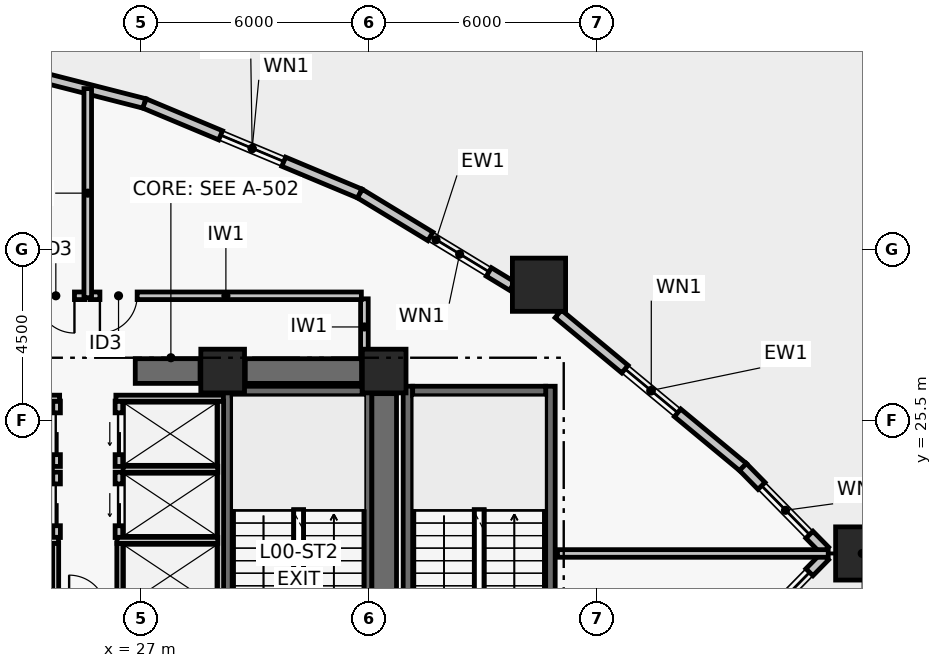
"""IFC4 building model, lengths in metres.
Left out: names, types, materials, properties, quantities, classifications, styles, units other than length and angle.
Written with IfcOpenShell. Run it as: python <this file> out.ifc"""

import sys

from ifc_helpers import new_model, si_unit, direction, frame, frame_2d, origin, origin_2d, place, context, subcontext, project, spatial, rectangle, hollow_rectangle, extrude, element, fill, save


model = new_model("IFC4")
c1 = context("Model", 3, precision=1e-05, world=origin(), true_north=direction((0.0, 1.0)))
c2 = subcontext(c1, "Body", "Model", "MODEL_VIEW")
j1 = project(units=[si_unit("LENGTHUNIT", "METRE"), si_unit("PLANEANGLEUNIT", "RADIAN")], contexts=[c1])
p1 = place(None, origin())
s1 = spatial("IfcSite", under=j1, at=p1, CompositionType="ELEMENT")
p2 = place(p1, origin())
s2 = spatial("IfcBuilding", under=s1, at=p2, CompositionType="ELEMENT")
p3 = place(p2, origin())
s3 = spatial("IfcBuildingStorey", under=s2, at=p3, CompositionType="ELEMENT", Elevation=0.0)
for number, where, z_axis, x_axis in (
    (1, (29.15, 26.8, 0.0), (0.0, 0.0, 1.0), (1.0, 0.0, 0.0)),
    (2, (33.4, 26.8, 0.0), (0.0, 0.0, 1.0), (1.0, 0.0, 0.0)),
):
    element("IfcColumn", number, at=place(p3, frame(where, z_axis=z_axis, x_axis=x_axis)), inside=s3, PredefinedType="COLUMN", context=c2, shape_type="SweptSolid", body=[
        extrude(rectangle(XDim=1.15, YDim=1.15, at=origin_2d()), origin(), (0.0, 0.0, 1.0), 7.2),
    ])
p4 = place(p3, frame((26.85, 26.8, 0.0), z_axis=(0.0, 0.0, 1.0), x_axis=(1.0, 0.0, 0.0)))
e3 = element("IfcWall", 3, at=p4, inside=s3, PredefinedType="SHEAR", context=c2, shape_type="SweptSolid", body=[
    extrude(rectangle(XDim=1.705, YDim=0.65, at=frame_2d((0.853, 0.0))), origin(), (0.0, 0.0, 1.0), 6.88),
])
p5 = place(p3, frame((29.745, 26.8, 0.0), z_axis=(0.0, 0.0, 1.0), x_axis=(1.0, 0.0, 0.0)))
e4 = element("IfcWall", 4, at=p5, inside=s3, PredefinedType="SHEAR", context=c2, shape_type="SweptSolid", body=[
    extrude(rectangle(XDim=3.06, YDim=0.65, at=frame_2d((1.53, 0.0))), origin(), (0.0, 0.0, 1.0), 6.88),
])
p6 = place(p3, frame((33.4, 17.795, 0.0), z_axis=(0.0, 0.0, 1.0), x_axis=(0.0, 1.0, 0.0)))
e5 = element("IfcWall", 5, at=p6, inside=s3, PredefinedType="SHEAR", context=c2, shape_type="SweptSolid", body=[
    extrude(rectangle(XDim=8.41, YDim=0.65, at=frame_2d((4.205, 0.0))), origin(), (0.0, 0.0, 1.0), 6.88),
])
p7 = place(p3, frame((29.275, 17.6, 0.0), z_axis=(0.0, 0.0, 1.0), x_axis=(0.0, 1.0, 0.0)))
e6 = element("IfcWall", 6, at=p7, inside=s3, PredefinedType="SHEAR", context=c2, shape_type="SweptSolid", body=[
    extrude(rectangle(XDim=8.8, YDim=0.25, at=frame_2d((4.4, 0.0))), origin(), (0.0, 0.0, 1.0), 6.88),
])
p8 = place(p7, frame((0.35, 0.0, 0.0)))
e7 = element("IfcOpeningElement", 7, at=p8, cuts=e6, PredefinedType="OPENING", context=c2, shape_type="SweptSolid", body=[
    extrude(rectangle(XDim=1.05, YDim=2.08, at=frame_2d((0.525, 1.04))), frame((0.0, 0.135, 0.0), z_axis=(0.0, -1.0, 0.0), x_axis=(1.0, 0.0, 0.0)), (0.0, 0.0, 1.0), 0.27),
])
p9 = place(p3, frame((32.946, 17.6, 0.0), z_axis=(0.0, 0.0, 1.0), x_axis=(0.0, 1.0, 0.0)))
e8 = element("IfcWall", 8, at=p9, inside=s3, PredefinedType="SHEAR", context=c2, shape_type="SweptSolid", body=[
    extrude(rectangle(XDim=8.8, YDim=0.25, at=frame_2d((4.4, 0.0))), origin(), (0.0, 0.0, 1.0), 6.88),
])
p10 = place(p3, frame((29.4, 26.275, 0.0), z_axis=(0.0, 0.0, 1.0), x_axis=(1.0, 0.0, 0.0)))
e9 = element("IfcWall", 9, at=p10, inside=s3, PredefinedType="SHEAR", context=c2, shape_type="SweptSolid", body=[
    extrude(rectangle(XDim=3.421, YDim=0.25, at=frame_2d((1.71, 0.0))), origin(), (0.0, 0.0, 1.0), 6.88),
])
for number, where, z_axis, x_axis in (
    (10, (34.025, 17.6, 0.0), (0.0, 0.0, 1.0), (0.0, 1.0, 0.0)),
    (11, (37.775, 17.6, 0.0), (0.0, 0.0, 1.0), (0.0, 1.0, 0.0)),
):
    element("IfcWall", number, at=place(p3, frame(where, z_axis=z_axis, x_axis=x_axis)), inside=s3, PredefinedType="SHEAR", context=c2, shape_type="SweptSolid", body=[
        extrude(rectangle(XDim=8.8, YDim=0.25, at=frame_2d((4.4, 0.0))), origin(), (0.0, 0.0, 1.0), 6.88),
    ])
p11 = place(p3, frame((34.15, 26.275, 0.0), z_axis=(0.0, 0.0, 1.0), x_axis=(1.0, 0.0, 0.0)))
e12 = element("IfcWall", 12, at=p11, inside=s3, PredefinedType="SHEAR", context=c2, shape_type="SweptSolid", body=[
    extrude(rectangle(XDim=3.5, YDim=0.25, at=frame_2d((1.75, 0.0))), origin(), (0.0, 0.0, 1.0), 6.88),
])
for number, where, z_axis, x_axis in (
    (13, (45.979, 22.0, 0.0), (0.0, 0.0, 1.0), (1.0, 0.0, 0.0)),
    (14, (37.474, 29.071, 0.0), (0.0, 0.0, 1.0), (1.0, 0.0, 0.0)),
):
    element("IfcColumn", number, at=place(p3, frame(where, z_axis=z_axis, x_axis=x_axis)), inside=s3, PredefinedType="USERDEFINED", context=c2, shape_type="SweptSolid", body=[
        extrude(hollow_rectangle(XDim=1.4, YDim=1.4, WallThickness=0.055, at=origin_2d()), origin(), (0.0, 0.0, 1.0), 7.2),
    ])
p12 = place(p3, frame((21.002, 35.394, 0.0), z_axis=(0.0, 0.0, 1.0), x_axis=(0.968977702302, -0.247148158887, 0.0)))
e15 = element("IfcWall", 15, at=p12, inside=s3, PredefinedType="PARTITIONING", context=c2, shape_type="SweptSolid", body=[
    extrude(rectangle(XDim=6.286, YDim=0.26, at=frame_2d((3.143, 0.0))), origin(), (0.0, 0.0, 1.0), 5.43),
])
p13 = place(p3, frame((27.092, 33.84, 0.0), z_axis=(0.0, 0.0, 1.0), x_axis=(0.922544641811, -0.385890378042, 0.0)))
e16 = element("IfcWall", 16, at=p13, inside=s3, PredefinedType="PARTITIONING", context=c2, shape_type="SweptSolid", body=[
    extrude(rectangle(XDim=6.144, YDim=0.26, at=frame_2d((3.072, 0.0))), origin(), (0.0, 0.0, 1.0), 5.43),
])
p14 = place(p13, frame((2.172, 0.0, 0.9)))
e17 = element("IfcOpeningElement", 17, at=p14, cuts=e16, PredefinedType="OPENING", context=c2, shape_type="SweptSolid", body=[
    extrude(rectangle(XDim=1.8, YDim=1.5, at=frame_2d((0.9, 0.75))), frame((0.0, 0.14, 0.0), z_axis=(0.0, -1.0, 0.0), x_axis=(1.0, 0.0, 0.0)), (0.0, 0.0, 1.0), 0.28),
])
p15 = place(p3, frame((32.76, 31.469, 0.0), z_axis=(0.0, 0.0, 1.0), x_axis=(0.854658781081, -0.519190107688, 0.0)))
e18 = element("IfcWall", 18, at=p15, inside=s3, PredefinedType="PARTITIONING", context=c2, shape_type="SweptSolid", body=[
    extrude(rectangle(XDim=4.688, YDim=0.26, at=frame_2d((2.344, 0.0))), origin(), (0.0, 0.0, 1.0), 5.43),
])
p16 = place(p15, frame((2.172, 0.0, 0.9)))
e19 = element("IfcOpeningElement", 19, at=p16, cuts=e18, PredefinedType="OPENING", context=c2, shape_type="SweptSolid", body=[
    extrude(rectangle(XDim=1.8, YDim=1.5, at=frame_2d((0.9, 0.75))), frame((0.0, 0.14, 0.0), z_axis=(0.0, -1.0, 0.0), x_axis=(1.0, 0.0, 0.0)), (0.0, 0.0, 1.0), 0.28),
])
p17 = place(p3, frame((37.982, 28.304, 0.0), z_axis=(0.0, 0.0, 1.0), x_axis=(0.769753796379, -0.638340890873, 0.0)))
e20 = element("IfcWall", 20, at=p17, inside=s3, PredefinedType="PARTITIONING", context=c2, shape_type="SweptSolid", body=[
    extrude(rectangle(XDim=6.324, YDim=0.26, at=frame_2d((3.162, 0.0))), origin(), (0.0, 0.0, 1.0), 5.43),
])
p18 = place(p17, frame((2.278, 0.0, 0.9)))
e21 = element("IfcOpeningElement", 21, at=p18, cuts=e20, PredefinedType="OPENING", context=c2, shape_type="SweptSolid", body=[
    extrude(rectangle(XDim=1.8, YDim=1.5, at=frame_2d((0.9, 0.75))), frame((0.0, 0.14, 0.0), z_axis=(0.0, -1.0, 0.0), x_axis=(1.0, 0.0, 0.0)), (0.0, 0.0, 1.0), 0.28),
])
p19 = place(p3, frame((42.841, 24.275, 0.0), z_axis=(0.0, 0.0, 1.0), x_axis=(0.700581279712, -0.713572610543, 0.0)))
e22 = element("IfcWall", 22, at=p19, inside=s3, PredefinedType="PARTITIONING", context=c2, shape_type="SweptSolid", body=[
    extrude(rectangle(XDim=3.082, YDim=0.26, at=frame_2d((1.541, 0.0))), origin(), (0.0, 0.0, 1.0), 5.43),
])
p20 = place(p19, frame((0.698, 0.0, 0.9)))
e23 = element("IfcOpeningElement", 23, at=p20, cuts=e22, PredefinedType="OPENING", context=c2, shape_type="SweptSolid", body=[
    extrude(rectangle(XDim=1.8, YDim=1.5, at=frame_2d((0.9, 0.75))), frame((0.0, 0.14, 0.0), z_axis=(0.0, -1.0, 0.0), x_axis=(1.0, 0.0, 0.0)), (0.0, 0.0, 1.0), 0.28),
])
p21 = place(p3, frame((45.0, 21.924, 0.0), z_axis=(0.0, 0.0, 1.0), x_axis=(-0.700581279712, -0.713572610543, 0.0)))
e24 = element("IfcWall", 24, at=p21, inside=s3, PredefinedType="PARTITIONING", context=c2, shape_type="SweptSolid", body=[
    extrude(rectangle(XDim=3.082, YDim=0.26, at=frame_2d((1.541, 0.0))), origin(), (0.0, 0.0, 1.0), 5.43),
])
p22 = place(p21, frame((0.585, 0.0, 0.9)))
e25 = element("IfcOpeningElement", 25, at=p22, cuts=e24, PredefinedType="OPENING", context=c2, shape_type="SweptSolid", body=[
    extrude(rectangle(XDim=1.8, YDim=1.5, at=frame_2d((0.9, 0.75))), frame((0.0, 0.14, 0.0), z_axis=(0.0, -1.0, 0.0), x_axis=(1.0, 0.0, 0.0)), (0.0, 0.0, 1.0), 0.28),
])
p23 = place(p3, frame((24.78, 22.42, 0.0), z_axis=(0.0, 0.0, 1.0), x_axis=(0.0, 1.0, 0.0)))
e26 = element("IfcWall", 26, at=p23, inside=s3, PredefinedType="PARTITIONING", context=c2, shape_type="SweptSolid", body=[
    extrude(rectangle(XDim=1.72, YDim=0.2, at=frame_2d((0.86, 0.0))), origin(), (0.0, 0.0, 1.0), 6.88),
])
p24 = place(p23, frame((0.31, 0.0, 0.0)))
e27 = element("IfcOpeningElement", 27, at=p24, cuts=e26, PredefinedType="OPENING", context=c2, shape_type="SweptSolid", body=[
    extrude(rectangle(XDim=1.1, YDim=2.08, at=frame_2d((0.55, 1.04))), frame((0.0, 0.11, 0.0), z_axis=(0.0, -1.0, 0.0), x_axis=(1.0, 0.0, 0.0)), (0.0, 0.0, 1.0), 0.22),
])
p25 = place(p3, frame((24.78, 24.29, 0.0), z_axis=(0.0, 0.0, 1.0), x_axis=(0.0, 1.0, 0.0)))
e28 = element("IfcWall", 28, at=p25, inside=s3, PredefinedType="PARTITIONING", context=c2, shape_type="SweptSolid", body=[
    extrude(rectangle(XDim=1.72, YDim=0.2, at=frame_2d((0.86, 0.0))), origin(), (0.0, 0.0, 1.0), 6.88),
])
p26 = place(p25, frame((0.31, 0.0, 0.0)))
e29 = element("IfcOpeningElement", 29, at=p26, cuts=e28, PredefinedType="OPENING", context=c2, shape_type="SweptSolid", body=[
    extrude(rectangle(XDim=1.1, YDim=2.08, at=frame_2d((0.55, 1.04))), frame((0.0, 0.11, 0.0), z_axis=(0.0, -1.0, 0.0), x_axis=(1.0, 0.0, 0.0)), (0.0, 0.0, 1.0), 0.22),
])
p27 = place(p3, frame((26.42, 22.42, 0.0), z_axis=(0.0, 0.0, 1.0), x_axis=(0.0, 1.0, 0.0)))
e30 = element("IfcWall", 30, at=p27, inside=s3, PredefinedType="PARTITIONING", context=c2, shape_type="SweptSolid", body=[
    extrude(rectangle(XDim=1.72, YDim=0.2, at=frame_2d((0.86, 0.0))), origin(), (0.0, 0.0, 1.0), 6.88),
])
p28 = place(p27, frame((0.31, 0.0, 0.0)))
e31 = element("IfcOpeningElement", 31, at=p28, cuts=e30, PredefinedType="OPENING", context=c2, shape_type="SweptSolid", body=[
    extrude(rectangle(XDim=1.1, YDim=2.08, at=frame_2d((0.55, 1.04))), frame((0.0, 0.11, 0.0), z_axis=(0.0, -1.0, 0.0), x_axis=(1.0, 0.0, 0.0)), (0.0, 0.0, 1.0), 0.22),
])
p29 = place(p3, frame((26.42, 24.29, 0.0), z_axis=(0.0, 0.0, 1.0), x_axis=(0.0, 1.0, 0.0)))
e32 = element("IfcWall", 32, at=p29, inside=s3, PredefinedType="PARTITIONING", context=c2, shape_type="SweptSolid", body=[
    extrude(rectangle(XDim=1.72, YDim=0.2, at=frame_2d((0.86, 0.0))), origin(), (0.0, 0.0, 1.0), 6.88),
])
p30 = place(p29, frame((0.31, 0.0, 0.0)))
e33 = element("IfcOpeningElement", 33, at=p30, cuts=e32, PredefinedType="OPENING", context=c2, shape_type="SweptSolid", body=[
    extrude(rectangle(XDim=1.1, YDim=2.08, at=frame_2d((0.55, 1.04))), frame((0.0, 0.11, 0.0), z_axis=(0.0, -1.0, 0.0), x_axis=(1.0, 0.0, 0.0)), (0.0, 0.0, 1.0), 0.22),
])
p31 = place(p3, frame((24.755, 20.56, 0.0), z_axis=(0.0, 0.0, 1.0), x_axis=(0.0, 1.0, 0.0)))
e34 = element("IfcWall", 34, at=p31, inside=s3, PredefinedType="PARTITIONING", context=c2, shape_type="SweptSolid", body=[
    extrude(rectangle(XDim=1.71, YDim=0.16, at=frame_2d((0.855, 0.0))), origin(), (0.0, 0.0, 1.0), 6.88),
])
p32 = place(p3, frame((22.18, 22.345, 0.0), z_axis=(0.0, 0.0, 1.0), x_axis=(1.0, 0.0, 0.0)))
e35 = element("IfcWall", 35, at=p32, inside=s3, PredefinedType="PARTITIONING", context=c2, shape_type="SweptSolid", body=[
    extrude(rectangle(XDim=2.65, YDim=0.16, at=frame_2d((1.325, 0.0))), origin(), (0.0, 0.0, 1.0), 6.88),
])
p33 = place(p3, frame((22.18, 24.215, 0.0), z_axis=(0.0, 0.0, 1.0), x_axis=(1.0, 0.0, 0.0)))
e36 = element("IfcWall", 36, at=p33, inside=s3, PredefinedType="PARTITIONING", context=c2, shape_type="SweptSolid", body=[
    extrude(rectangle(XDim=2.49, YDim=0.16, at=frame_2d((1.245, 0.0))), origin(), (0.0, 0.0, 1.0), 6.88),
])
p34 = place(p3, frame((22.03, 26.085, 0.0), z_axis=(0.0, 0.0, 1.0), x_axis=(1.0, 0.0, 0.0)))
e37 = element("IfcWall", 37, at=p34, inside=s3, PredefinedType="PARTITIONING", context=c2, shape_type="SweptSolid", body=[
    extrude(rectangle(XDim=2.83, YDim=0.16, at=frame_2d((1.415, 0.0))), origin(), (0.0, 0.0, 1.0), 6.88),
])
p35 = place(p3, frame((29.095, 20.56, 0.0), z_axis=(0.0, 0.0, 1.0), x_axis=(0.0, 1.0, 0.0)))
e38 = element("IfcWall", 38, at=p35, inside=s3, PredefinedType="PARTITIONING", context=c2, shape_type="SweptSolid", body=[
    extrude(rectangle(XDim=5.45, YDim=0.16, at=frame_2d((2.725, 0.0))), origin(), (0.0, 0.0, 1.0), 6.88),
])
p36 = place(p3, frame((26.445, 20.56, 0.0), z_axis=(0.0, 0.0, 1.0), x_axis=(0.0, 1.0, 0.0)))
e39 = element("IfcWall", 39, at=p36, inside=s3, PredefinedType="PARTITIONING", context=c2, shape_type="SweptSolid", body=[
    extrude(rectangle(XDim=1.71, YDim=0.16, at=frame_2d((0.855, 0.0))), origin(), (0.0, 0.0, 1.0), 6.88),
])
p37 = place(p3, frame((26.37, 22.345, 0.0), z_axis=(0.0, 0.0, 1.0), x_axis=(1.0, 0.0, 0.0)))
e40 = element("IfcWall", 40, at=p37, inside=s3, PredefinedType="PARTITIONING", context=c2, shape_type="SweptSolid", body=[
    extrude(rectangle(XDim=2.65, YDim=0.16, at=frame_2d((1.325, 0.0))), origin(), (0.0, 0.0, 1.0), 6.88),
])
p38 = place(p3, frame((26.53, 24.215, 0.0), z_axis=(0.0, 0.0, 1.0), x_axis=(1.0, 0.0, 0.0)))
e41 = element("IfcWall", 41, at=p38, inside=s3, PredefinedType="PARTITIONING", context=c2, shape_type="SweptSolid", body=[
    extrude(rectangle(XDim=2.49, YDim=0.16, at=frame_2d((1.245, 0.0))), origin(), (0.0, 0.0, 1.0), 6.88),
])
p39 = place(p3, frame((26.34, 26.085, 0.0), z_axis=(0.0, 0.0, 1.0), x_axis=(1.0, 0.0, 0.0)))
e42 = element("IfcWall", 42, at=p39, inside=s3, PredefinedType="PARTITIONING", context=c2, shape_type="SweptSolid", body=[
    extrude(rectangle(XDim=2.83, YDim=0.16, at=frame_2d((1.415, 0.0))), origin(), (0.0, 0.0, 1.0), 6.88),
])
p40 = place(p3, frame((33.74, 27.22, 0.0), z_axis=(0.0, 0.0, 1.0), x_axis=(-1.0, 0.0, 0.0)))
e43 = element("IfcWall", 43, at=p40, inside=s3, PredefinedType="PARTITIONING", context=c2, shape_type="SweptSolid", body=[
    extrude(rectangle(XDim=0.86, YDim=0.2, at=frame_2d((0.43, 0.0))), origin(), (0.0, 0.0, 1.0), 5.46),
])
p41 = place(p3, frame((32.88, 27.22, 0.0), z_axis=(0.0, 0.0, 1.0), x_axis=(0.0, 1.0, 0.0)))
e44 = element("IfcWall", 44, at=p41, inside=s3, PredefinedType="PARTITIONING", context=c2, shape_type="SweptSolid", body=[
    extrude(rectangle(XDim=1.48, YDim=0.2, at=frame_2d((0.74, 0.0))), origin(), (0.0, 0.0, 1.0), 6.01),
])
p42 = place(p3, frame((32.8, 28.78, 0.0), z_axis=(0.0, 0.0, 1.0), x_axis=(-1.0, 0.0, 0.0)))
e45 = element("IfcWall", 45, at=p42, inside=s3, PredefinedType="PARTITIONING", context=c2, shape_type="SweptSolid", body=[
    extrude(rectangle(XDim=7.13, YDim=0.2, at=frame_2d((3.565, 0.0))), origin(), (0.0, 0.0, 1.0), 6.88),
])
p43 = place(p42, frame((5.9, 0.0, 0.0)))
e46 = element("IfcOpeningElement", 46, at=p43, cuts=e45, PredefinedType="OPENING", context=c2, shape_type="SweptSolid", body=[
    extrude(rectangle(XDim=0.98, YDim=2.06, at=frame_2d((0.49, 1.03))), frame((0.0, 0.11, 0.0), z_axis=(0.0, -1.0, 0.0), x_axis=(1.0, 0.0, 0.0)), (0.0, 0.0, 1.0), 0.22),
])
p44 = place(p3, frame((25.53, 28.78, 0.0), z_axis=(0.0, 0.0, 1.0), x_axis=(-1.0, 0.0, 0.0)))
e47 = element("IfcWall", 47, at=p44, inside=s3, PredefinedType="PARTITIONING", context=c2, shape_type="SweptSolid", body=[
    extrude(rectangle(XDim=7.978, YDim=0.2, at=frame_2d((3.989, 0.0))), origin(), (0.0, 0.0, 1.0), 5.46),
])
p45 = place(p44, frame((0.28, 0.0, 0.0)))
e48 = element("IfcOpeningElement", 48, at=p45, cuts=e47, PredefinedType="OPENING", context=c2, shape_type="SweptSolid", body=[
    extrude(rectangle(XDim=0.98, YDim=2.06, at=frame_2d((0.49, 1.03))), frame((0.0, 0.11, 0.0), z_axis=(0.0, -1.0, 0.0), x_axis=(1.0, 0.0, 0.0)), (0.0, 0.0, 1.0), 0.22),
])
p46 = place(p3, frame((25.6, 28.73, 0.0), z_axis=(0.0, 0.0, 1.0), x_axis=(0.0, 1.0, 0.0)))
e49 = element("IfcWall", 49, at=p46, inside=s3, PredefinedType="PARTITIONING", context=c2, shape_type="SweptSolid", body=[
    extrude(rectangle(XDim=5.501, YDim=0.2, at=frame_2d((2.75, 0.0))), origin(), (0.0, 0.0, 1.0), 6.88),
])
p47 = place(p3, frame((37.96, 22.0, 0.0), z_axis=(0.0, 0.0, 1.0), x_axis=(1.0, 0.0, 0.0)))
e50 = element("IfcWall", 50, at=p47, inside=s3, PredefinedType="PARTITIONING", context=c2, shape_type="SweptSolid", body=[
    extrude(rectangle(XDim=7.125, YDim=0.2, at=frame_2d((3.562, 0.0))), origin(), (0.0, 0.0, 1.0), 6.88),
])
p48 = place(p14, origin())
e51 = element("IfcWindow", 51, at=p48, inside=s3, PartitioningType="SINGLE_PANEL", PredefinedType="WINDOW", context=c2, shape_type="SweptSolid", body=[
    extrude(rectangle(XDim=1.8, YDim=1.5, at=frame_2d((0.9, 0.75))), frame((0.0, 0.03, 0.0), z_axis=(0.0, -1.0, 0.0), x_axis=(1.0, 0.0, 0.0)), (0.0, 0.0, 1.0), 0.06),
])
fill(e17, e51)
p49 = place(p16, origin())
e52 = element("IfcWindow", 52, at=p49, inside=s3, PartitioningType="SINGLE_PANEL", PredefinedType="WINDOW", context=c2, shape_type="SweptSolid", body=[
    extrude(rectangle(XDim=1.8, YDim=1.5, at=frame_2d((0.9, 0.75))), frame((0.0, 0.03, 0.0), z_axis=(0.0, -1.0, 0.0), x_axis=(1.0, 0.0, 0.0)), (0.0, 0.0, 1.0), 0.06),
])
fill(e19, e52)
p50 = place(p18, origin())
e53 = element("IfcWindow", 53, at=p50, inside=s3, PartitioningType="SINGLE_PANEL", PredefinedType="WINDOW", context=c2, shape_type="SweptSolid", body=[
    extrude(rectangle(XDim=1.8, YDim=1.5, at=frame_2d((0.9, 0.75))), frame((0.0, 0.03, 0.0), z_axis=(0.0, -1.0, 0.0), x_axis=(1.0, 0.0, 0.0)), (0.0, 0.0, 1.0), 0.06),
])
fill(e21, e53)
p51 = place(p20, origin())
e54 = element("IfcWindow", 54, at=p51, inside=s3, PartitioningType="SINGLE_PANEL", PredefinedType="WINDOW", context=c2, shape_type="SweptSolid", body=[
    extrude(rectangle(XDim=1.8, YDim=1.5, at=frame_2d((0.9, 0.75))), frame((0.0, 0.03, 0.0), z_axis=(0.0, -1.0, 0.0), x_axis=(1.0, 0.0, 0.0)), (0.0, 0.0, 1.0), 0.06),
])
fill(e23, e54)
p52 = place(p22, origin())
e55 = element("IfcWindow", 55, at=p52, inside=s3, PartitioningType="SINGLE_PANEL", PredefinedType="WINDOW", context=c2, shape_type="SweptSolid", body=[
    extrude(rectangle(XDim=1.8, YDim=1.5, at=frame_2d((0.9, 0.75))), frame((0.0, 0.03, 0.0), z_axis=(0.0, -1.0, 0.0), x_axis=(1.0, 0.0, 0.0)), (0.0, 0.0, 1.0), 0.06),
])
fill(e25, e55)
p53 = place(p24, origin())
e56 = element("IfcDoor", 56, at=p53, inside=s3, OperationType="DOUBLE_DOOR_SLIDING", PredefinedType="DOOR", context=c2, shape_type="SweptSolid", body=[
    extrude(rectangle(XDim=1.1, YDim=2.08, at=frame_2d((0.55, 1.04))), frame((0.0, 0.025, 0.0), z_axis=(0.0, -1.0, 0.0), x_axis=(1.0, 0.0, 0.0)), (0.0, 0.0, 1.0), 0.05),
])
fill(e27, e56)
p54 = place(p26, origin())
e57 = element("IfcDoor", 57, at=p54, inside=s3, OperationType="DOUBLE_DOOR_SLIDING", PredefinedType="DOOR", context=c2, shape_type="SweptSolid", body=[
    extrude(rectangle(XDim=1.1, YDim=2.08, at=frame_2d((0.55, 1.04))), frame((0.0, 0.025, 0.0), z_axis=(0.0, -1.0, 0.0), x_axis=(1.0, 0.0, 0.0)), (0.0, 0.0, 1.0), 0.05),
])
fill(e29, e57)
p55 = place(p28, origin())
e58 = element("IfcDoor", 58, at=p55, inside=s3, OperationType="DOUBLE_DOOR_SLIDING", PredefinedType="DOOR", context=c2, shape_type="SweptSolid", body=[
    extrude(rectangle(XDim=1.1, YDim=2.08, at=frame_2d((0.55, 1.04))), frame((0.0, 0.025, 0.0), z_axis=(0.0, -1.0, 0.0), x_axis=(1.0, 0.0, 0.0)), (0.0, 0.0, 1.0), 0.05),
])
fill(e31, e58)
p56 = place(p30, origin())
e59 = element("IfcDoor", 59, at=p56, inside=s3, OperationType="DOUBLE_DOOR_SLIDING", PredefinedType="DOOR", context=c2, shape_type="SweptSolid", body=[
    extrude(rectangle(XDim=1.1, YDim=2.08, at=frame_2d((0.55, 1.04))), frame((0.0, 0.025, 0.0), z_axis=(0.0, -1.0, 0.0), x_axis=(1.0, 0.0, 0.0)), (0.0, 0.0, 1.0), 0.05),
])
fill(e33, e59)
p57 = place(p43, origin())
e60 = element("IfcDoor", 60, at=p57, inside=s3, OperationType="SINGLE_SWING_RIGHT", PredefinedType="DOOR", context=c2, shape_type="SweptSolid", body=[
    extrude(rectangle(XDim=0.98, YDim=2.06, at=frame_2d((0.49, 1.03))), frame((0.0, 0.025, 0.0), z_axis=(0.0, -1.0, 0.0), x_axis=(1.0, 0.0, 0.0)), (0.0, 0.0, 1.0), 0.05),
])
fill(e46, e60)
p58 = place(p45, origin())
e61 = element("IfcDoor", 61, at=p58, inside=s3, OperationType="SINGLE_SWING_LEFT", PredefinedType="DOOR", context=c2, shape_type="SweptSolid", body=[
    extrude(rectangle(XDim=0.98, YDim=2.06, at=frame_2d((0.49, 1.03))), frame((0.0, 0.025, 0.0), z_axis=(0.0, -1.0, 0.0), x_axis=(1.0, 0.0, 0.0)), (0.0, 0.0, 1.0), 0.05),
])
fill(e48, e61)
save(model, sys.argv[1])
